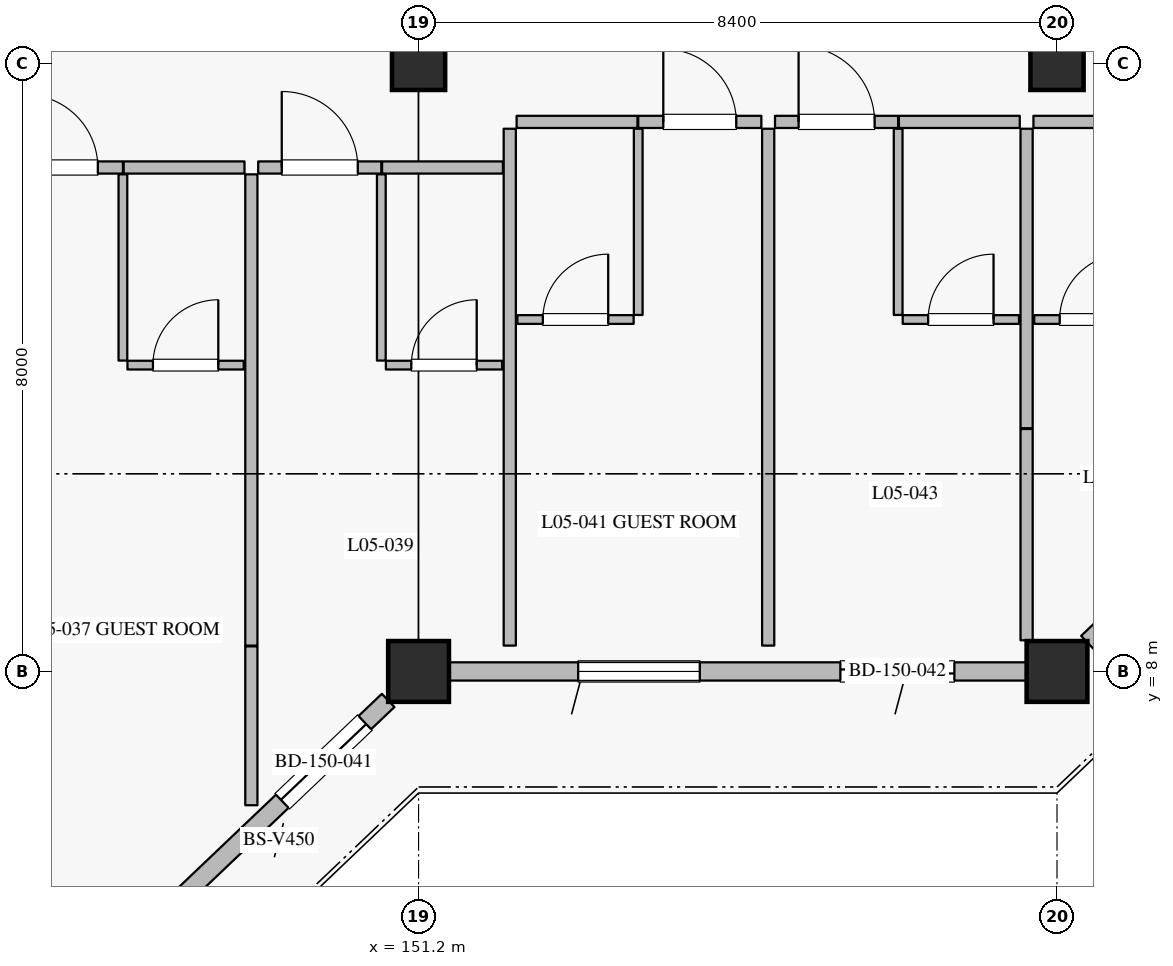
"""IFC4 building model, lengths in metres.
Left out: names, types, materials, properties, quantities, classifications, styles, units other than length and angle.
Written with IfcOpenShell. Run it as: python <this file> out.ifc"""

import sys

from ifc_helpers import new_model, si_unit, direction, frame, frame_2d, origin, origin_2d, place, context, subcontext, project, spatial, rectangle, extrude, element, fill, save


model = new_model("IFC4")
c1 = context("Model", 3, precision=1e-05, world=origin(), true_north=direction((0.0, 1.0)))
c2 = subcontext(c1, "Body", "Model", "MODEL_VIEW")
j1 = project(units=[si_unit("LENGTHUNIT", "METRE"), si_unit("PLANEANGLEUNIT", "RADIAN")], contexts=[c1])
p1 = place(None, origin())
s1 = spatial("IfcSite", under=j1, at=p1, CompositionType="ELEMENT")
p2 = place(p1, origin())
s2 = spatial("IfcBuilding", under=s1, at=p2, CompositionType="ELEMENT")
p3 = place(p2, frame((0.0, 0.0, 25.2)))
s3 = spatial("IfcBuildingStorey", under=s2, at=p3, CompositionType="ELEMENT", Elevation=25.2)
for number, where, z_axis, x_axis in (
    (1, (151.2, 8.0, 0.0), (0.0, 0.0, 1.0), (1.0, 0.0, 0.0)),
    (2, (159.6, 8.0, 0.0), (0.0, 0.0, 1.0), (1.0, 0.0, 0.0)),
):
    element("IfcColumn", number, at=place(p3, frame(where, z_axis=z_axis, x_axis=x_axis)), inside=s3, PredefinedType="COLUMN", context=c2, shape_type="SweptSolid", body=[
        extrude(rectangle(XDim=0.8, YDim=0.8, at=origin_2d()), origin(), (0.0, 0.0, 1.0), 3.6),
    ])
for number, where, z_axis, x_axis in (
    (3, (151.2, 16.0, 0.0), (0.0, 0.0, 1.0), (1.0, 0.0, 0.0)),
    (4, (159.6, 16.0, 0.0), (0.0, 0.0, 1.0), (1.0, 0.0, 0.0)),
):
    element("IfcColumn", number, at=place(p3, frame(where, z_axis=z_axis, x_axis=x_axis)), inside=s3, PredefinedType="COLUMN", context=c2, shape_type="SweptSolid", body=[
        extrude(rectangle(XDim=0.7, YDim=0.7, at=origin_2d()), origin(), (0.0, 0.0, 1.0), 3.6),
    ])
p4 = place(p3, frame((150.8, 7.619, 0.0), z_axis=(0.0, 0.0, 1.0), x_axis=(-0.724156739794, -0.689635422677, 0.0)))
e5 = element("IfcWall", 5, at=p4, inside=s3, PredefinedType="SOLIDWALL", context=c2, shape_type="SweptSolid", body=[
    extrude(rectangle(XDim=10.495, YDim=0.24, at=frame_2d((5.248, 0.0))), origin(), (0.0, 0.0, 1.0), 2.93),
])
p5 = place(p4, frame((0.424, 0.0, 0.0)))
e6 = element("IfcOpeningElement", 6, at=p5, cuts=e5, PredefinedType="OPENING", context=c2, shape_type="SweptSolid", body=[
    extrude(rectangle(XDim=1.5, YDim=2.25, at=frame_2d((0.75, 1.125))), frame((0.0, 0.13, 0.0), z_axis=(0.0, -1.0, 0.0), x_axis=(1.0, 0.0, 0.0)), (0.0, 0.0, 1.0), 0.26),
])
p6 = place(p4, frame((4.033, 0.0, 0.8)))
e7 = element("IfcOpeningElement", 7, at=p6, cuts=e5, PredefinedType="OPENING", context=c2, shape_type="SweptSolid", body=[
    extrude(rectangle(XDim=1.6, YDim=1.6, at=frame_2d((0.8, 0.8))), frame((0.0, 0.13, 0.0), z_axis=(0.0, -1.0, 0.0), x_axis=(1.0, 0.0, 0.0)), (0.0, 0.0, 1.0), 0.26),
])
p7 = place(p4, frame((8.107, 0.0, 0.8)))
e8 = element("IfcOpeningElement", 8, at=p7, cuts=e5, PredefinedType="OPENING", context=c2, shape_type="SweptSolid", body=[
    extrude(rectangle(XDim=1.6, YDim=1.6, at=frame_2d((0.8, 0.8))), frame((0.0, 0.13, 0.0), z_axis=(0.0, -1.0, 0.0), x_axis=(1.0, 0.0, 0.0)), (0.0, 0.0, 1.0), 0.26),
])
p8 = place(p3, frame((159.2, 8.0, 0.0), z_axis=(0.0, 0.0, 1.0), x_axis=(-1.0, 0.0, 0.0)))
e9 = element("IfcWall", 9, at=p8, inside=s3, PredefinedType="SOLIDWALL", context=c2, shape_type="SweptSolid", body=[
    extrude(rectangle(XDim=7.6, YDim=0.24, at=frame_2d((3.8, 0.0))), origin(), (0.0, 0.0, 1.0), 2.93),
])
p9 = place(p8, frame((0.95, 0.0, 0.0)))
e10 = element("IfcOpeningElement", 10, at=p9, cuts=e9, PredefinedType="OPENING", context=c2, shape_type="SweptSolid", body=[
    extrude(rectangle(XDim=1.5, YDim=2.25, at=frame_2d((0.75, 1.125))), frame((0.0, 0.13, 0.0), z_axis=(0.0, -1.0, 0.0), x_axis=(1.0, 0.0, 0.0)), (0.0, 0.0, 1.0), 0.26),
])
p10 = place(p8, frame((4.3, 0.0, 0.8)))
e11 = element("IfcOpeningElement", 11, at=p10, cuts=e9, PredefinedType="OPENING", context=c2, shape_type="SweptSolid", body=[
    extrude(rectangle(XDim=1.6, YDim=1.6, at=frame_2d((0.8, 0.8))), frame((0.0, 0.13, 0.0), z_axis=(0.0, -1.0, 0.0), x_axis=(1.0, 0.0, 0.0)), (0.0, 0.0, 1.0), 0.26),
])
p11 = place(p3, frame((167.6, 15.619, 0.0), z_axis=(0.0, 0.0, 1.0), x_axis=(-0.724156739794, -0.689635422677, 0.0)))
e12 = element("IfcWall", 12, at=p11, inside=s3, PredefinedType="SOLIDWALL", context=c2, shape_type="SweptSolid", body=[
    extrude(rectangle(XDim=10.495, YDim=0.24, at=frame_2d((5.248, 0.0))), origin(), (0.0, 0.0, 1.0), 2.93),
])
p12 = place(p11, frame((0.286, 0.0, 0.0)))
e13 = element("IfcOpeningElement", 13, at=p12, cuts=e12, PredefinedType="OPENING", context=c2, shape_type="SweptSolid", body=[
    extrude(rectangle(XDim=1.5, YDim=2.25, at=frame_2d((0.75, 1.125))), frame((0.0, 0.13, 0.0), z_axis=(0.0, -1.0, 0.0), x_axis=(1.0, 0.0, 0.0)), (0.0, 0.0, 1.0), 0.26),
])
p13 = place(p11, frame((3.757, 0.0, 0.8)))
e14 = element("IfcOpeningElement", 14, at=p13, cuts=e12, PredefinedType="OPENING", context=c2, shape_type="SweptSolid", body=[
    extrude(rectangle(XDim=1.6, YDim=1.6, at=frame_2d((0.8, 0.8))), frame((0.0, 0.13, 0.0), z_axis=(0.0, -1.0, 0.0), x_axis=(1.0, 0.0, 0.0)), (0.0, 0.0, 1.0), 0.26),
])
p14 = place(p11, frame((7.969, 0.0, 0.8)))
e15 = element("IfcOpeningElement", 15, at=p14, cuts=e12, PredefinedType="OPENING", context=c2, shape_type="SweptSolid", body=[
    extrude(rectangle(XDim=1.6, YDim=1.6, at=frame_2d((0.8, 0.8))), frame((0.0, 0.13, 0.0), z_axis=(0.0, -1.0, 0.0), x_axis=(1.0, 0.0, 0.0)), (0.0, 0.0, 1.0), 0.26),
])
p15 = place(p3, frame((145.69, 14.63, 0.0), z_axis=(0.0, 0.0, 1.0), x_axis=(1.0, 0.0, 0.0)))
e16 = element("IfcWall", 16, at=p15, inside=s3, PredefinedType="PARTITIONING", context=c2, shape_type="SweptSolid", body=[
    extrude(rectangle(XDim=1.62, YDim=0.16, at=frame_2d((0.81, 0.0))), origin(), (0.0, 0.0, 1.0), 3.335),
])
p16 = place(p15, frame((0.33, 0.0, 0.0)))
e17 = element("IfcOpeningElement", 17, at=p16, cuts=e16, PredefinedType="OPENING", context=c2, shape_type="SweptSolid", body=[
    extrude(rectangle(XDim=0.96, YDim=2.2, at=frame_2d((0.48, 1.1))), frame((0.0, 0.09, 0.0), z_axis=(0.0, -1.0, 0.0), x_axis=(1.0, 0.0, 0.0)), (0.0, 0.0, 1.0), 0.18),
])
p17 = place(p3, frame((147.32, 14.63, 0.0), z_axis=(0.0, 0.0, 1.0), x_axis=(1.0, 0.0, 0.0)))
e18 = element("IfcWall", 18, at=p17, inside=s3, PredefinedType="PARTITIONING", context=c2, shape_type="SweptSolid", body=[
    extrude(rectangle(XDim=1.59, YDim=0.16, at=frame_2d((0.795, 0.0))), origin(), (0.0, 0.0, 1.0), 3.335),
])
p18 = place(p3, frame((147.31, 12.09, 0.0), z_axis=(0.0, 0.0, 1.0), x_axis=(0.0, 1.0, 0.0)))
e19 = element("IfcWall", 19, at=p18, inside=s3, PredefinedType="PARTITIONING", context=c2, shape_type="SweptSolid", body=[
    extrude(rectangle(XDim=2.45, YDim=0.115, at=frame_2d((1.225, 0.0))), origin(), (0.0, 0.0, 1.0), 3.335),
])
p19 = place(p3, frame((147.37, 12.03, 0.0), z_axis=(0.0, 0.0, 1.0), x_axis=(1.0, 0.0, 0.0)))
e20 = element("IfcWall", 20, at=p19, inside=s3, PredefinedType="PARTITIONING", context=c2, shape_type="SweptSolid", body=[
    extrude(rectangle(XDim=1.53, YDim=0.115, at=frame_2d((0.765, 0.0))), origin(), (0.0, 0.0, 1.0), 3.335),
])
p20 = place(p19, frame((0.335, 0.0, 0.0)))
e21 = element("IfcOpeningElement", 21, at=p20, cuts=e20, PredefinedType="OPENING", context=c2, shape_type="SweptSolid", body=[
    extrude(rectangle(XDim=0.86, YDim=2.12, at=frame_2d((0.43, 1.06))), frame((0.0, 0.067, 0.0), z_axis=(0.0, -1.0, 0.0), x_axis=(1.0, 0.0, 0.0)), (0.0, 0.0, 1.0), 0.135),
])
p21 = place(p3, frame((149.0, 6.24, 0.0), z_axis=(0.0, 0.0, 1.0), x_axis=(0.0, 1.0, 0.0)))
e22 = element("IfcWall", 22, at=p21, inside=s3, PredefinedType="PARTITIONING", context=c2, shape_type="SweptSolid", body=[
    extrude(rectangle(XDim=2.09, YDim=0.16, at=frame_2d((1.045, 0.0))), origin(), (0.0, 0.0, 1.0), 3.335),
])
p22 = place(p3, frame((149.09, 14.63, 0.0), z_axis=(0.0, 0.0, 1.0), x_axis=(1.0, 0.0, 0.0)))
e23 = element("IfcWall", 23, at=p22, inside=s3, PredefinedType="PARTITIONING", context=c2, shape_type="SweptSolid", body=[
    extrude(rectangle(XDim=1.62, YDim=0.16, at=frame_2d((0.81, 0.0))), origin(), (0.0, 0.0, 1.0), 3.335),
])
p23 = place(p22, frame((0.31, 0.0, 0.0)))
e24 = element("IfcOpeningElement", 24, at=p23, cuts=e23, PredefinedType="OPENING", context=c2, shape_type="SweptSolid", body=[
    extrude(rectangle(XDim=1.0, YDim=2.25, at=frame_2d((0.5, 1.125))), frame((0.0, 0.09, 0.0), z_axis=(0.0, -1.0, 0.0), x_axis=(1.0, 0.0, 0.0)), (0.0, 0.0, 1.0), 0.18),
])
p24 = place(p3, frame((150.72, 14.63, 0.0), z_axis=(0.0, 0.0, 1.0), x_axis=(1.0, 0.0, 0.0)))
e25 = element("IfcWall", 25, at=p24, inside=s3, PredefinedType="PARTITIONING", context=c2, shape_type="SweptSolid", body=[
    extrude(rectangle(XDim=1.59, YDim=0.16, at=frame_2d((0.795, 0.0))), origin(), (0.0, 0.0, 1.0), 3.335),
])
p25 = place(p3, frame((150.71, 12.09, 0.0), z_axis=(0.0, 0.0, 1.0), x_axis=(0.0, 1.0, 0.0)))
e26 = element("IfcWall", 26, at=p25, inside=s3, PredefinedType="PARTITIONING", context=c2, shape_type="SweptSolid", body=[
    extrude(rectangle(XDim=2.45, YDim=0.115, at=frame_2d((1.225, 0.0))), origin(), (0.0, 0.0, 1.0), 3.335),
])
p26 = place(p3, frame((150.77, 12.03, 0.0), z_axis=(0.0, 0.0, 1.0), x_axis=(1.0, 0.0, 0.0)))
e27 = element("IfcWall", 27, at=p26, inside=s3, PredefinedType="PARTITIONING", context=c2, shape_type="SweptSolid", body=[
    extrude(rectangle(XDim=1.53, YDim=0.115, at=frame_2d((0.765, 0.0))), origin(), (0.0, 0.0, 1.0), 3.335),
])
p27 = place(p26, frame((0.335, 0.0, 0.0)))
e28 = element("IfcOpeningElement", 28, at=p27, cuts=e27, PredefinedType="OPENING", context=c2, shape_type="SweptSolid", body=[
    extrude(rectangle(XDim=0.86, YDim=2.12, at=frame_2d((0.43, 1.06))), frame((0.0, 0.067, 0.0), z_axis=(0.0, -1.0, 0.0), x_axis=(1.0, 0.0, 0.0)), (0.0, 0.0, 1.0), 0.135),
])
p28 = place(p3, frame((149.0, 8.34, 0.0), z_axis=(0.0, 0.0, 1.0), x_axis=(0.0, 1.0, 0.0)))
e29 = element("IfcWall", 29, at=p28, inside=s3, PredefinedType="PARTITIONING", context=c2, shape_type="SweptSolid", body=[
    extrude(rectangle(XDim=6.2, YDim=0.16, at=frame_2d((3.1, 0.0))), origin(), (0.0, 0.0, 1.0), 3.335),
])
p29 = place(p3, frame((152.49, 15.23, 0.0), z_axis=(0.0, 0.0, 1.0), x_axis=(1.0, 0.0, 0.0)))
e30 = element("IfcWall", 30, at=p29, inside=s3, PredefinedType="PARTITIONING", context=c2, shape_type="SweptSolid", body=[
    extrude(rectangle(XDim=1.59, YDim=0.16, at=frame_2d((0.795, 0.0))), origin(), (0.0, 0.0, 1.0), 3.335),
])
p30 = place(p3, frame((154.09, 15.23, 0.0), z_axis=(0.0, 0.0, 1.0), x_axis=(1.0, 0.0, 0.0)))
e31 = element("IfcWall", 31, at=p30, inside=s3, PredefinedType="PARTITIONING", context=c2, shape_type="SweptSolid", body=[
    extrude(rectangle(XDim=1.62, YDim=0.16, at=frame_2d((0.81, 0.0))), origin(), (0.0, 0.0, 1.0), 3.335),
])
p31 = place(p30, frame((0.33, 0.0, 0.0)))
e32 = element("IfcOpeningElement", 32, at=p31, cuts=e31, PredefinedType="OPENING", context=c2, shape_type="SweptSolid", body=[
    extrude(rectangle(XDim=0.96, YDim=2.2, at=frame_2d((0.48, 1.1))), frame((0.0, 0.09, 0.0), z_axis=(0.0, -1.0, 0.0), x_axis=(1.0, 0.0, 0.0)), (0.0, 0.0, 1.0), 0.18),
])
p32 = place(p3, frame((154.09, 12.69, 0.0), z_axis=(0.0, 0.0, 1.0), x_axis=(0.0, 1.0, 0.0)))
e33 = element("IfcWall", 33, at=p32, inside=s3, PredefinedType="PARTITIONING", context=c2, shape_type="SweptSolid", body=[
    extrude(rectangle(XDim=2.45, YDim=0.115, at=frame_2d((1.225, 0.0))), origin(), (0.0, 0.0, 1.0), 3.335),
])
p33 = place(p3, frame((152.5, 12.63, 0.0), z_axis=(0.0, 0.0, 1.0), x_axis=(1.0, 0.0, 0.0)))
e34 = element("IfcWall", 34, at=p33, inside=s3, PredefinedType="PARTITIONING", context=c2, shape_type="SweptSolid", body=[
    extrude(rectangle(XDim=1.53, YDim=0.115, at=frame_2d((0.765, 0.0))), origin(), (0.0, 0.0, 1.0), 3.335),
])
p34 = place(p33, frame((0.335, 0.0, 0.0)))
e35 = element("IfcOpeningElement", 35, at=p34, cuts=e34, PredefinedType="OPENING", context=c2, shape_type="SweptSolid", body=[
    extrude(rectangle(XDim=0.86, YDim=2.12, at=frame_2d((0.43, 1.06))), frame((0.0, 0.067, 0.0), z_axis=(0.0, -1.0, 0.0), x_axis=(1.0, 0.0, 0.0)), (0.0, 0.0, 1.0), 0.135),
])
p35 = place(p3, frame((152.4, 8.34, 0.0), z_axis=(0.0, 0.0, 1.0), x_axis=(0.0, 1.0, 0.0)))
e36 = element("IfcWall", 36, at=p35, inside=s3, PredefinedType="PARTITIONING", context=c2, shape_type="SweptSolid", body=[
    extrude(rectangle(XDim=6.8, YDim=0.16, at=frame_2d((3.4, 0.0))), origin(), (0.0, 0.0, 1.0), 3.335),
])
p36 = place(p3, frame((155.89, 15.23, 0.0), z_axis=(0.0, 0.0, 1.0), x_axis=(1.0, 0.0, 0.0)))
e37 = element("IfcWall", 37, at=p36, inside=s3, PredefinedType="PARTITIONING", context=c2, shape_type="SweptSolid", body=[
    extrude(rectangle(XDim=1.62, YDim=0.16, at=frame_2d((0.81, 0.0))), origin(), (0.0, 0.0, 1.0), 3.335),
])
p37 = place(p36, frame((0.31, 0.0, 0.0)))
e38 = element("IfcOpeningElement", 38, at=p37, cuts=e37, PredefinedType="OPENING", context=c2, shape_type="SweptSolid", body=[
    extrude(rectangle(XDim=1.0, YDim=2.25, at=frame_2d((0.5, 1.125))), frame((0.0, 0.09, 0.0), z_axis=(0.0, -1.0, 0.0), x_axis=(1.0, 0.0, 0.0)), (0.0, 0.0, 1.0), 0.18),
])
p38 = place(p3, frame((157.52, 15.23, 0.0), z_axis=(0.0, 0.0, 1.0), x_axis=(1.0, 0.0, 0.0)))
e39 = element("IfcWall", 39, at=p38, inside=s3, PredefinedType="PARTITIONING", context=c2, shape_type="SweptSolid", body=[
    extrude(rectangle(XDim=1.59, YDim=0.16, at=frame_2d((0.795, 0.0))), origin(), (0.0, 0.0, 1.0), 3.335),
])
p39 = place(p3, frame((157.51, 12.69, 0.0), z_axis=(0.0, 0.0, 1.0), x_axis=(0.0, 1.0, 0.0)))
e40 = element("IfcWall", 40, at=p39, inside=s3, PredefinedType="PARTITIONING", context=c2, shape_type="SweptSolid", body=[
    extrude(rectangle(XDim=2.45, YDim=0.115, at=frame_2d((1.225, 0.0))), origin(), (0.0, 0.0, 1.0), 3.335),
])
p40 = place(p3, frame((157.57, 12.63, 0.0), z_axis=(0.0, 0.0, 1.0), x_axis=(1.0, 0.0, 0.0)))
e41 = element("IfcWall", 41, at=p40, inside=s3, PredefinedType="PARTITIONING", context=c2, shape_type="SweptSolid", body=[
    extrude(rectangle(XDim=1.53, YDim=0.115, at=frame_2d((0.765, 0.0))), origin(), (0.0, 0.0, 1.0), 3.335),
])
p41 = place(p40, frame((0.335, 0.0, 0.0)))
e42 = element("IfcOpeningElement", 42, at=p41, cuts=e41, PredefinedType="OPENING", context=c2, shape_type="SweptSolid", body=[
    extrude(rectangle(XDim=0.86, YDim=2.12, at=frame_2d((0.43, 1.06))), frame((0.0, 0.067, 0.0), z_axis=(0.0, -1.0, 0.0), x_axis=(1.0, 0.0, 0.0)), (0.0, 0.0, 1.0), 0.135),
])
p42 = place(p3, frame((155.8, 8.34, 0.0), z_axis=(0.0, 0.0, 1.0), x_axis=(0.0, 1.0, 0.0)))
e43 = element("IfcWall", 43, at=p42, inside=s3, PredefinedType="PARTITIONING", context=c2, shape_type="SweptSolid", body=[
    extrude(rectangle(XDim=6.8, YDim=0.16, at=frame_2d((3.4, 0.0))), origin(), (0.0, 0.0, 1.0), 3.335),
])
p43 = place(p3, frame((159.2, 8.41, 0.0), z_axis=(0.0, 0.0, 1.0), x_axis=(0.0, 1.0, 0.0)))
e44 = element("IfcWall", 44, at=p43, inside=s3, PredefinedType="PARTITIONING", context=c2, shape_type="SweptSolid", body=[
    extrude(rectangle(XDim=2.78, YDim=0.16, at=frame_2d((1.39, 0.0))), origin(), (0.0, 0.0, 1.0), 3.335),
])
p44 = place(p3, frame((159.29, 15.23, 0.0), z_axis=(0.0, 0.0, 1.0), x_axis=(1.0, 0.0, 0.0)))
e45 = element("IfcWall", 45, at=p44, inside=s3, PredefinedType="PARTITIONING", context=c2, shape_type="SweptSolid", body=[
    extrude(rectangle(XDim=1.59, YDim=0.16, at=frame_2d((0.795, 0.0))), origin(), (0.0, 0.0, 1.0), 3.335),
])
p45 = place(p3, frame((159.3, 12.63, 0.0), z_axis=(0.0, 0.0, 1.0), x_axis=(1.0, 0.0, 0.0)))
e46 = element("IfcWall", 46, at=p45, inside=s3, PredefinedType="PARTITIONING", context=c2, shape_type="SweptSolid", body=[
    extrude(rectangle(XDim=1.53, YDim=0.115, at=frame_2d((0.765, 0.0))), origin(), (0.0, 0.0, 1.0), 3.335),
])
p46 = place(p45, frame((0.335, 0.0, 0.0)))
e47 = element("IfcOpeningElement", 47, at=p46, cuts=e46, PredefinedType="OPENING", context=c2, shape_type="SweptSolid", body=[
    extrude(rectangle(XDim=0.86, YDim=2.12, at=frame_2d((0.43, 1.06))), frame((0.0, 0.067, 0.0), z_axis=(0.0, -1.0, 0.0), x_axis=(1.0, 0.0, 0.0)), (0.0, 0.0, 1.0), 0.135),
])
p47 = place(p3, frame((159.2, 11.2, 0.0), z_axis=(0.0, 0.0, 1.0), x_axis=(0.0, 1.0, 0.0)))
e48 = element("IfcWall", 48, at=p47, inside=s3, PredefinedType="PARTITIONING", context=c2, shape_type="SweptSolid", body=[
    extrude(rectangle(XDim=3.94, YDim=0.16, at=frame_2d((1.97, 0.0))), origin(), (0.0, 0.0, 1.0), 3.335),
])
p48 = place(p5, origin())
e49 = element("IfcDoor", 49, at=p48, inside=s3, OperationType="SLIDING_TO_LEFT", PredefinedType="DOOR", context=c2, shape_type="SweptSolid", body=[
    extrude(rectangle(XDim=1.5, YDim=2.25, at=frame_2d((0.75, 1.125))), frame((0.0, 0.025, 0.0), z_axis=(0.0, -1.0, 0.0), x_axis=(1.0, 0.0, 0.0)), (0.0, 0.0, 1.0), 0.05),
])
fill(e6, e49)
p49 = place(p9, origin())
e50 = element("IfcDoor", 50, at=p49, inside=s3, OperationType="SLIDING_TO_LEFT", PredefinedType="DOOR", context=c2, shape_type="SweptSolid", body=[
    extrude(rectangle(XDim=1.5, YDim=2.25, at=frame_2d((0.75, 1.125))), frame((0.0, 0.025, 0.0), z_axis=(0.0, -1.0, 0.0), x_axis=(1.0, 0.0, 0.0)), (0.0, 0.0, 1.0), 0.05),
])
fill(e10, e50)
p50 = place(p10, origin())
e51 = element("IfcWindow", 51, at=p50, inside=s3, PartitioningType="SINGLE_PANEL", PredefinedType="WINDOW", context=c2, shape_type="SweptSolid", body=[
    extrude(rectangle(XDim=1.6, YDim=1.6, at=frame_2d((0.8, 0.8))), frame((0.0, 0.03, 0.0), z_axis=(0.0, -1.0, 0.0), x_axis=(1.0, 0.0, 0.0)), (0.0, 0.0, 1.0), 0.06),
])
fill(e11, e51)
p51 = place(p16, origin())
e52 = element("IfcDoor", 52, at=p51, inside=s3, OperationType="SINGLE_SWING_LEFT", PredefinedType="DOOR", context=c2, shape_type="SweptSolid", body=[
    extrude(rectangle(XDim=0.96, YDim=2.2, at=frame_2d((0.48, 1.1))), frame((0.0, 0.025, 0.0), z_axis=(0.0, -1.0, 0.0), x_axis=(1.0, 0.0, 0.0)), (0.0, 0.0, 1.0), 0.05),
])
fill(e17, e52)
p52 = place(p20, origin())
e53 = element("IfcDoor", 53, at=p52, inside=s3, OperationType="SINGLE_SWING_RIGHT", PredefinedType="DOOR", context=c2, shape_type="SweptSolid", body=[
    extrude(rectangle(XDim=0.86, YDim=2.12, at=frame_2d((0.43, 1.06))), frame((0.0, 0.025, 0.0), z_axis=(0.0, -1.0, 0.0), x_axis=(1.0, 0.0, 0.0)), (0.0, 0.0, 1.0), 0.05),
])
fill(e21, e53)
p53 = place(p23, origin())
e54 = element("IfcDoor", 54, at=p53, inside=s3, OperationType="SINGLE_SWING_LEFT", PredefinedType="DOOR", context=c2, shape_type="SweptSolid", body=[
    extrude(rectangle(XDim=1.0, YDim=2.25, at=frame_2d((0.5, 1.125))), frame((0.0, 0.025, 0.0), z_axis=(0.0, -1.0, 0.0), x_axis=(1.0, 0.0, 0.0)), (0.0, 0.0, 1.0), 0.05),
])
fill(e24, e54)
p54 = place(p27, origin())
e55 = element("IfcDoor", 55, at=p54, inside=s3, OperationType="SINGLE_SWING_RIGHT", PredefinedType="DOOR", context=c2, shape_type="SweptSolid", body=[
    extrude(rectangle(XDim=0.86, YDim=2.12, at=frame_2d((0.43, 1.06))), frame((0.0, 0.025, 0.0), z_axis=(0.0, -1.0, 0.0), x_axis=(1.0, 0.0, 0.0)), (0.0, 0.0, 1.0), 0.05),
])
fill(e28, e55)
p55 = place(p31, origin())
e56 = element("IfcDoor", 56, at=p55, inside=s3, OperationType="SINGLE_SWING_LEFT", PredefinedType="DOOR", context=c2, shape_type="SweptSolid", body=[
    extrude(rectangle(XDim=0.96, YDim=2.2, at=frame_2d((0.48, 1.1))), frame((0.0, 0.025, 0.0), z_axis=(0.0, -1.0, 0.0), x_axis=(1.0, 0.0, 0.0)), (0.0, 0.0, 1.0), 0.05),
])
fill(e32, e56)
p56 = place(p34, origin())
e57 = element("IfcDoor", 57, at=p56, inside=s3, OperationType="SINGLE_SWING_RIGHT", PredefinedType="DOOR", context=c2, shape_type="SweptSolid", body=[
    extrude(rectangle(XDim=0.86, YDim=2.12, at=frame_2d((0.43, 1.06))), frame((0.0, 0.025, 0.0), z_axis=(0.0, -1.0, 0.0), x_axis=(1.0, 0.0, 0.0)), (0.0, 0.0, 1.0), 0.05),
])
fill(e35, e57)
p57 = place(p37, origin())
e58 = element("IfcDoor", 58, at=p57, inside=s3, OperationType="SINGLE_SWING_LEFT", PredefinedType="DOOR", context=c2, shape_type="SweptSolid", body=[
    extrude(rectangle(XDim=1.0, YDim=2.25, at=frame_2d((0.5, 1.125))), frame((0.0, 0.025, 0.0), z_axis=(0.0, -1.0, 0.0), x_axis=(1.0, 0.0, 0.0)), (0.0, 0.0, 1.0), 0.05),
])
fill(e38, e58)
p58 = place(p41, origin())
e59 = element("IfcDoor", 59, at=p58, inside=s3, OperationType="SINGLE_SWING_RIGHT", PredefinedType="DOOR", context=c2, shape_type="SweptSolid", body=[
    extrude(rectangle(XDim=0.86, YDim=2.12, at=frame_2d((0.43, 1.06))), frame((0.0, 0.025, 0.0), z_axis=(0.0, -1.0, 0.0), x_axis=(1.0, 0.0, 0.0)), (0.0, 0.0, 1.0), 0.05),
])
fill(e42, e59)
p59 = place(p46, origin())
e60 = element("IfcDoor", 60, at=p59, inside=s3, OperationType="SINGLE_SWING_RIGHT", PredefinedType="DOOR", context=c2, shape_type="SweptSolid", body=[
    extrude(rectangle(XDim=0.86, YDim=2.12, at=frame_2d((0.43, 1.06))), frame((0.0, 0.025, 0.0), z_axis=(0.0, -1.0, 0.0), x_axis=(1.0, 0.0, 0.0)), (0.0, 0.0, 1.0), 0.05),
])
fill(e47, e60)
save(model, sys.argv[1])
